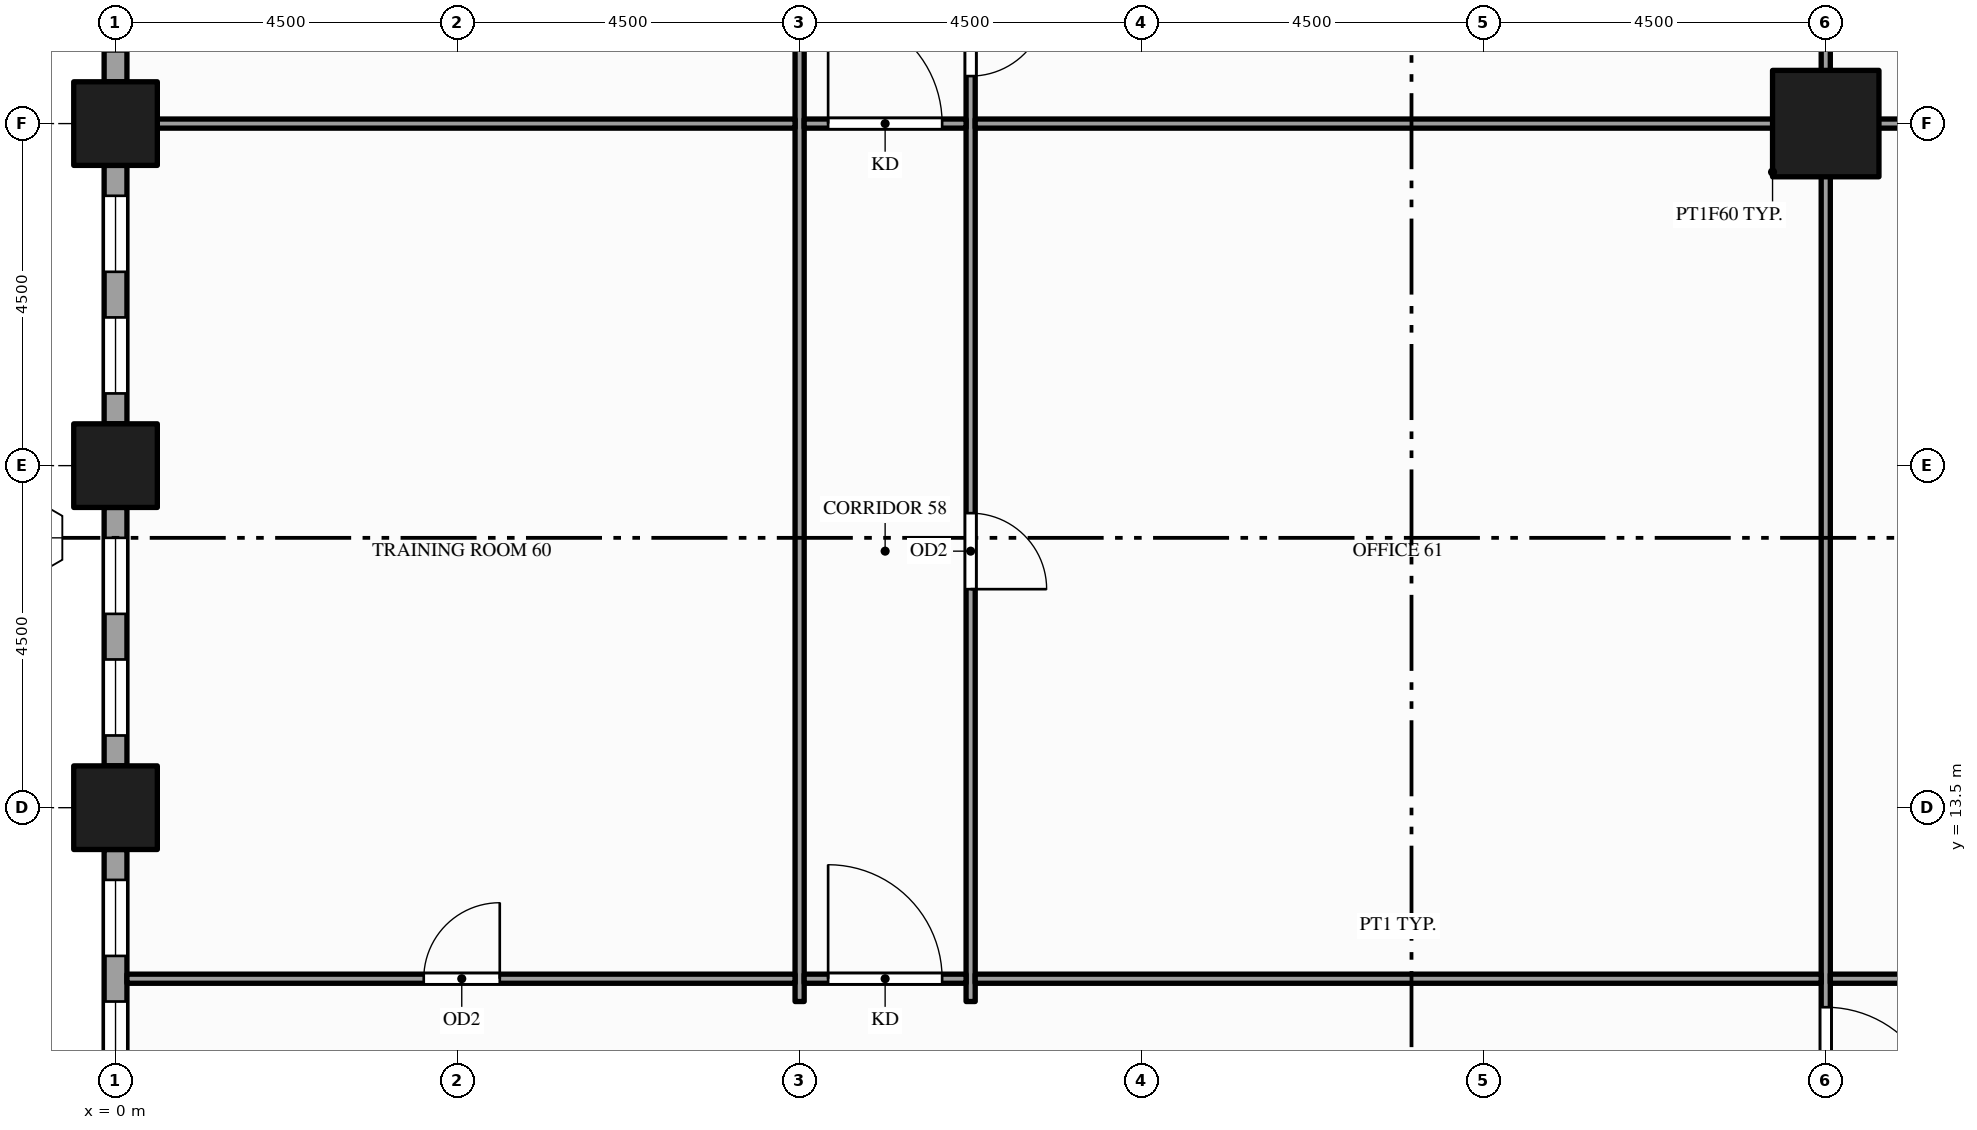
"""IFC4 building model, lengths in metres.
Left out: names, types, materials, properties, quantities, classifications, styles, units other than length and angle.
Written with IfcOpenShell. Run it as: python <this file> out.ifc"""

import sys

from ifc_helpers import new_model, si_unit, direction, frame, frame_2d, origin, origin_2d, place, context, subcontext, project, spatial, rectangle, hollow_rectangle, extrude, element, fill, save


model = new_model("IFC4")
c1 = context("Model", 3, precision=1e-05, world=origin(), true_north=direction((0.0, 1.0)))
c2 = subcontext(c1, "Body", "Model", "MODEL_VIEW")
j1 = project(units=[si_unit("LENGTHUNIT", "METRE"), si_unit("PLANEANGLEUNIT", "RADIAN")], contexts=[c1])
p1 = place(None, origin())
s1 = spatial("IfcSite", under=j1, at=p1, CompositionType="ELEMENT")
p2 = place(p1, origin())
s2 = spatial("IfcBuilding", under=s1, at=p2, CompositionType="ELEMENT")
p3 = place(p2, frame((0.0, 0.0, 19.0)))
s3 = spatial("IfcBuildingStorey", under=s2, at=p3, CompositionType="ELEMENT", Elevation=19.0)
for number, where, z_axis, x_axis in (
    (1, (0.0, 13.5, -0.25), (0.0, 0.0, 1.0), (1.0, 0.0, 0.0)),
    (2, (0.0, 18.0, -0.25), (0.0, 0.0, 1.0), (1.0, 0.0, 0.0)),
    (3, (0.0, 22.5, -0.25), (0.0, 0.0, 1.0), (1.0, 0.0, 0.0)),
):
    element("IfcColumn", number, at=place(p3, frame(where, z_axis=z_axis, x_axis=x_axis)), inside=s3, PredefinedType="COLUMN", context=c2, shape_type="SweptSolid", body=[
        extrude(hollow_rectangle(XDim=1.1, YDim=1.1, WallThickness=0.06, at=origin_2d()), origin(), (0.0, 0.0, 1.0), 5.0),
    ])
p4 = place(p3, frame((22.5, 22.5, -0.25), z_axis=(0.0, 0.0, 1.0), x_axis=(1.0, 0.0, 0.0)))
e4 = element("IfcColumn", 4, at=p4, inside=s3, PredefinedType="COLUMN", context=c2, shape_type="SweptSolid", body=[
    extrude(hollow_rectangle(XDim=1.4, YDim=1.4, WallThickness=0.08, at=origin_2d()), origin(), (0.0, 0.0, 1.0), 5.0),
])
p5 = place(p3, frame((0.0, 26.45, 0.0), z_axis=(0.0, 0.0, 1.0), x_axis=(0.0, -1.0, 0.0)))
e5 = element("IfcWall", 5, at=p5, inside=s3, PredefinedType="STANDARD", context=c2, shape_type="SweptSolid", body=[
    extrude(rectangle(XDim=3.4, YDim=0.3, at=frame_2d((1.7, 0.0))), origin(), (0.0, 0.0, 1.0), 4.036),
])
p6 = place(p5, frame((0.4, 0.0, 0.9)))
e6 = element("IfcOpeningElement", 6, at=p6, cuts=e5, PredefinedType="OPENING", context=c2, shape_type="SweptSolid", body=[
    extrude(rectangle(XDim=1.0, YDim=2.75, at=frame_2d((0.5, 1.375))), frame((0.0, 0.16, 0.0), z_axis=(0.0, -1.0, 0.0), x_axis=(1.0, 0.0, 0.0)), (0.0, 0.0, 1.0), 0.32),
])
p7 = place(p5, frame((2.0, 0.0, 0.9)))
e7 = element("IfcOpeningElement", 7, at=p7, cuts=e5, PredefinedType="OPENING", context=c2, shape_type="SweptSolid", body=[
    extrude(rectangle(XDim=1.0, YDim=2.75, at=frame_2d((0.5, 1.375))), frame((0.0, 0.16, 0.0), z_axis=(0.0, -1.0, 0.0), x_axis=(1.0, 0.0, 0.0)), (0.0, 0.0, 1.0), 0.32),
])
p8 = place(p3, frame((0.0, 21.95, 0.0), z_axis=(0.0, 0.0, 1.0), x_axis=(0.0, -1.0, 0.0)))
e8 = element("IfcWall", 8, at=p8, inside=s3, PredefinedType="STANDARD", context=c2, shape_type="SweptSolid", body=[
    extrude(rectangle(XDim=3.4, YDim=0.3, at=frame_2d((1.7, 0.0))), origin(), (0.0, 0.0, 1.0), 4.036),
])
p9 = place(p8, frame((0.4, 0.0, 0.9)))
e9 = element("IfcOpeningElement", 9, at=p9, cuts=e8, PredefinedType="OPENING", context=c2, shape_type="SweptSolid", body=[
    extrude(rectangle(XDim=1.0, YDim=2.75, at=frame_2d((0.5, 1.375))), frame((0.0, 0.16, 0.0), z_axis=(0.0, -1.0, 0.0), x_axis=(1.0, 0.0, 0.0)), (0.0, 0.0, 1.0), 0.32),
])
p10 = place(p8, frame((2.0, 0.0, 0.9)))
e10 = element("IfcOpeningElement", 10, at=p10, cuts=e8, PredefinedType="OPENING", context=c2, shape_type="SweptSolid", body=[
    extrude(rectangle(XDim=1.0, YDim=2.75, at=frame_2d((0.5, 1.375))), frame((0.0, 0.16, 0.0), z_axis=(0.0, -1.0, 0.0), x_axis=(1.0, 0.0, 0.0)), (0.0, 0.0, 1.0), 0.32),
])
p11 = place(p3, frame((0.0, 17.45, 0.0), z_axis=(0.0, 0.0, 1.0), x_axis=(0.0, -1.0, 0.0)))
e11 = element("IfcWall", 11, at=p11, inside=s3, PredefinedType="STANDARD", context=c2, shape_type="SweptSolid", body=[
    extrude(rectangle(XDim=3.4, YDim=0.3, at=frame_2d((1.7, 0.0))), origin(), (0.0, 0.0, 1.0), 4.036),
])
p12 = place(p11, frame((0.4, 0.0, 0.9)))
e12 = element("IfcOpeningElement", 12, at=p12, cuts=e11, PredefinedType="OPENING", context=c2, shape_type="SweptSolid", body=[
    extrude(rectangle(XDim=1.0, YDim=2.75, at=frame_2d((0.5, 1.375))), frame((0.0, 0.16, 0.0), z_axis=(0.0, -1.0, 0.0), x_axis=(1.0, 0.0, 0.0)), (0.0, 0.0, 1.0), 0.32),
])
p13 = place(p11, frame((2.0, 0.0, 0.9)))
e13 = element("IfcOpeningElement", 13, at=p13, cuts=e11, PredefinedType="OPENING", context=c2, shape_type="SweptSolid", body=[
    extrude(rectangle(XDim=1.0, YDim=2.75, at=frame_2d((0.5, 1.375))), frame((0.0, 0.16, 0.0), z_axis=(0.0, -1.0, 0.0), x_axis=(1.0, 0.0, 0.0)), (0.0, 0.0, 1.0), 0.32),
])
p14 = place(p3, frame((0.0, 12.95, 0.0), z_axis=(0.0, 0.0, 1.0), x_axis=(0.0, -1.0, 0.0)))
e14 = element("IfcWall", 14, at=p14, inside=s3, PredefinedType="STANDARD", context=c2, shape_type="SweptSolid", body=[
    extrude(rectangle(XDim=3.4, YDim=0.3, at=frame_2d((1.7, 0.0))), origin(), (0.0, 0.0, 1.0), 4.036),
])
p15 = place(p14, frame((0.4, 0.0, 0.9)))
e15 = element("IfcOpeningElement", 15, at=p15, cuts=e14, PredefinedType="OPENING", context=c2, shape_type="SweptSolid", body=[
    extrude(rectangle(XDim=1.0, YDim=2.75, at=frame_2d((0.5, 1.375))), frame((0.0, 0.16, 0.0), z_axis=(0.0, -1.0, 0.0), x_axis=(1.0, 0.0, 0.0)), (0.0, 0.0, 1.0), 0.32),
])
p16 = place(p14, frame((2.0, 0.0, 0.9)))
e16 = element("IfcOpeningElement", 16, at=p16, cuts=e14, PredefinedType="OPENING", context=c2, shape_type="SweptSolid", body=[
    extrude(rectangle(XDim=1.0, YDim=2.75, at=frame_2d((0.5, 1.375))), frame((0.0, 0.16, 0.0), z_axis=(0.0, -1.0, 0.0), x_axis=(1.0, 0.0, 0.0)), (0.0, 0.0, 1.0), 0.32),
])
p17 = place(p3, frame((9.0, 10.95, 0.0), z_axis=(0.0, 0.0, 1.0), x_axis=(0.0, 1.0, 0.0)))
e17 = element("IfcWall", 17, at=p17, inside=s3, PredefinedType="PARTITIONING", context=c2, shape_type="SweptSolid", body=[
    extrude(rectangle(XDim=20.85, YDim=0.12, at=frame_2d((10.425, 0.0))), origin(), (0.0, 0.0, 1.0), 3.5),
])
p18 = place(p17, frame((15.55, 0.0, 0.0)))
e18 = element("IfcOpeningElement", 18, at=p18, cuts=e17, PredefinedType="OPENING", context=c2, shape_type="SweptSolid", body=[
    extrude(rectangle(XDim=1.0, YDim=2.1, at=frame_2d((0.5, 1.05))), frame((0.0, 0.07, 0.0), z_axis=(0.0, -1.0, 0.0), x_axis=(1.0, 0.0, 0.0)), (0.0, 0.0, 1.0), 0.14),
])
p19 = place(p3, frame((11.25, 10.95, 0.0), z_axis=(0.0, 0.0, 1.0), x_axis=(0.0, 1.0, 0.0)))
e19 = element("IfcWall", 19, at=p19, inside=s3, PredefinedType="PARTITIONING", context=c2, shape_type="SweptSolid", body=[
    extrude(rectangle(XDim=20.85, YDim=0.12, at=frame_2d((10.425, 0.0))), origin(), (0.0, 0.0, 1.0), 3.5),
])
p20 = place(p19, frame((5.425, 0.0, 0.0)))
e20 = element("IfcOpeningElement", 20, at=p20, cuts=e19, PredefinedType="OPENING", context=c2, shape_type="SweptSolid", body=[
    extrude(rectangle(XDim=1.0, YDim=2.1, at=frame_2d((0.5, 1.05))), frame((0.0, 0.07, 0.0), z_axis=(0.0, -1.0, 0.0), x_axis=(1.0, 0.0, 0.0)), (0.0, 0.0, 1.0), 0.14),
])
p21 = place(p19, frame((12.175, 0.0, 0.0)))
e21 = element("IfcOpeningElement", 21, at=p21, cuts=e19, PredefinedType="OPENING", context=c2, shape_type="SweptSolid", body=[
    extrude(rectangle(XDim=1.0, YDim=2.1, at=frame_2d((0.5, 1.05))), frame((0.0, 0.07, 0.0), z_axis=(0.0, -1.0, 0.0), x_axis=(1.0, 0.0, 0.0)), (0.0, 0.0, 1.0), 0.14),
])
p22 = place(p19, frame((16.675, 0.0, 0.0)))
e22 = element("IfcOpeningElement", 22, at=p22, cuts=e19, PredefinedType="OPENING", context=c2, shape_type="SweptSolid", body=[
    extrude(rectangle(XDim=1.0, YDim=2.1, at=frame_2d((0.5, 1.05))), frame((0.0, 0.07, 0.0), z_axis=(0.0, -1.0, 0.0), x_axis=(1.0, 0.0, 0.0)), (0.0, 0.0, 1.0), 0.14),
])
p23 = place(p3, frame((22.5, 0.15, 0.0), z_axis=(0.0, 0.0, 1.0), x_axis=(0.0, 1.0, 0.0)))
e23 = element("IfcWall", 23, at=p23, inside=s3, PredefinedType="PARTITIONING", context=c2, shape_type="SweptSolid", body=[
    extrude(rectangle(XDim=35.95, YDim=0.12, at=frame_2d((17.975, 0.0))), origin(), (0.0, 0.0, 1.0), 3.759),
])
p24 = place(p23, frame((9.225, 0.0, 0.0)))
e24 = element("IfcOpeningElement", 24, at=p24, cuts=e23, PredefinedType="OPENING", context=c2, shape_type="SweptSolid", body=[
    extrude(rectangle(XDim=1.5, YDim=2.1, at=frame_2d((0.75, 1.05))), frame((0.0, 0.07, 0.0), z_axis=(0.0, -1.0, 0.0), x_axis=(1.0, 0.0, 0.0)), (0.0, 0.0, 1.0), 0.14),
])
p25 = place(p23, frame((32.7, 0.0, 0.0)))
e25 = element("IfcOpeningElement", 25, at=p25, cuts=e23, PredefinedType="OPENING", context=c2, shape_type="SweptSolid", body=[
    extrude(rectangle(XDim=1.8, YDim=2.1, at=frame_2d((0.9, 1.05))), frame((0.0, 0.07, 0.0), z_axis=(0.0, -1.0, 0.0), x_axis=(1.0, 0.0, 0.0)), (0.0, 0.0, 1.0), 0.14),
])
p26 = place(p3, frame((0.15, 11.25, 0.0), z_axis=(0.0, 0.0, 1.0), x_axis=(1.0, 0.0, 0.0)))
e26 = element("IfcWall", 26, at=p26, inside=s3, PredefinedType="PARTITIONING", context=c2, shape_type="SweptSolid", body=[
    extrude(rectangle(XDim=8.79, YDim=0.12, at=frame_2d((4.395, 0.0))), origin(), (0.0, 0.0, 1.0), 3.759),
])
p27 = place(p26, frame((3.905, 0.0, 0.0)))
e27 = element("IfcOpeningElement", 27, at=p27, cuts=e26, PredefinedType="OPENING", context=c2, shape_type="SweptSolid", body=[
    extrude(rectangle(XDim=1.0, YDim=2.1, at=frame_2d((0.5, 1.05))), frame((0.0, 0.07, 0.0), z_axis=(0.0, -1.0, 0.0), x_axis=(1.0, 0.0, 0.0)), (0.0, 0.0, 1.0), 0.14),
])
p28 = place(p3, frame((9.06, 11.25, 0.0), z_axis=(0.0, 0.0, 1.0), x_axis=(1.0, 0.0, 0.0)))
e28 = element("IfcWall", 28, at=p28, inside=s3, PredefinedType="PARTITIONING", context=c2, shape_type="SweptSolid", body=[
    extrude(rectangle(XDim=2.13, YDim=0.12, at=frame_2d((1.065, 0.0))), origin(), (0.0, 0.0, 1.0), 3.759),
])
p29 = place(p28, frame((0.315, 0.0, 0.0)))
e29 = element("IfcOpeningElement", 29, at=p29, cuts=e28, PredefinedType="OPENING", context=c2, shape_type="SweptSolid", body=[
    extrude(rectangle(XDim=1.5, YDim=2.1, at=frame_2d((0.75, 1.05))), frame((0.0, 0.07, 0.0), z_axis=(0.0, -1.0, 0.0), x_axis=(1.0, 0.0, 0.0)), (0.0, 0.0, 1.0), 0.14),
])
p30 = place(p3, frame((11.31, 11.25, 0.0), z_axis=(0.0, 0.0, 1.0), x_axis=(1.0, 0.0, 0.0)))
e30 = element("IfcWall", 30, at=p30, inside=s3, PredefinedType="PARTITIONING", context=c2, shape_type="SweptSolid", body=[
    extrude(rectangle(XDim=11.13, YDim=0.12, at=frame_2d((5.565, 0.0))), origin(), (0.0, 0.0, 1.0), 3.759),
])
p31 = place(p3, frame((22.56, 11.25, 0.0), z_axis=(0.0, 0.0, 1.0), x_axis=(1.0, 0.0, 0.0)))
e31 = element("IfcWall", 31, at=p31, inside=s3, PredefinedType="PARTITIONING", context=c2, shape_type="SweptSolid", body=[
    extrude(rectangle(XDim=13.38, YDim=0.12, at=frame_2d((6.69, 0.0))), origin(), (0.0, 0.0, 1.0), 3.66),
])
p32 = place(p31, frame((6.09, 0.0, 0.0)))
e32 = element("IfcOpeningElement", 32, at=p32, cuts=e31, PredefinedType="OPENING", context=c2, shape_type="SweptSolid", body=[
    extrude(rectangle(XDim=1.2, YDim=2.1, at=frame_2d((0.6, 1.05))), frame((0.0, 0.07, 0.0), z_axis=(0.0, -1.0, 0.0), x_axis=(1.0, 0.0, 0.0)), (0.0, 0.0, 1.0), 0.14),
])
p33 = place(p3, frame((0.15, 22.5, 0.0), z_axis=(0.0, 0.0, 1.0), x_axis=(1.0, 0.0, 0.0)))
e33 = element("IfcWall", 33, at=p33, inside=s3, PredefinedType="PARTITIONING", context=c2, shape_type="SweptSolid", body=[
    extrude(rectangle(XDim=8.79, YDim=0.12, at=frame_2d((4.395, 0.0))), origin(), (0.0, 0.0, 1.0), 3.5),
])
p34 = place(p3, frame((9.06, 22.5, 0.0), z_axis=(0.0, 0.0, 1.0), x_axis=(1.0, 0.0, 0.0)))
e34 = element("IfcWall", 34, at=p34, inside=s3, PredefinedType="PARTITIONING", context=c2, shape_type="SweptSolid", body=[
    extrude(rectangle(XDim=2.13, YDim=0.12, at=frame_2d((1.065, 0.0))), origin(), (0.0, 0.0, 1.0), 3.5),
])
p35 = place(p34, frame((0.315, 0.0, 0.0)))
e35 = element("IfcOpeningElement", 35, at=p35, cuts=e34, PredefinedType="OPENING", context=c2, shape_type="SweptSolid", body=[
    extrude(rectangle(XDim=1.5, YDim=2.1, at=frame_2d((0.75, 1.05))), frame((0.0, 0.07, 0.0), z_axis=(0.0, -1.0, 0.0), x_axis=(1.0, 0.0, 0.0)), (0.0, 0.0, 1.0), 0.14),
])
p36 = place(p3, frame((11.31, 22.5, 0.0), z_axis=(0.0, 0.0, 1.0), x_axis=(1.0, 0.0, 0.0)))
e36 = element("IfcWall", 36, at=p36, inside=s3, PredefinedType="PARTITIONING", context=c2, shape_type="SweptSolid", body=[
    extrude(rectangle(XDim=11.13, YDim=0.12, at=frame_2d((5.565, 0.0))), origin(), (0.0, 0.0, 1.0), 3.5),
])
p37 = place(p3, frame((22.56, 22.5, 0.0), z_axis=(0.0, 0.0, 1.0), x_axis=(1.0, 0.0, 0.0)))
e37 = element("IfcWall", 37, at=p37, inside=s3, PredefinedType="PARTITIONING", context=c2, shape_type="SweptSolid", body=[
    extrude(rectangle(XDim=13.38, YDim=0.12, at=frame_2d((6.69, 0.0))), origin(), (0.0, 0.0, 1.0), 3.66),
])
p38 = place(p9, origin())
e38 = element("IfcWindow", 38, at=p38, inside=s3, PartitioningType="SINGLE_PANEL", PredefinedType="WINDOW", context=c2, shape_type="SweptSolid", body=[
    extrude(rectangle(XDim=1.0, YDim=2.75, at=frame_2d((0.5, 1.375))), frame((0.0, 0.03, 0.0), z_axis=(0.0, -1.0, 0.0), x_axis=(1.0, 0.0, 0.0)), (0.0, 0.0, 1.0), 0.06),
])
fill(e9, e38)
p39 = place(p10, origin())
e39 = element("IfcWindow", 39, at=p39, inside=s3, PartitioningType="SINGLE_PANEL", PredefinedType="WINDOW", context=c2, shape_type="SweptSolid", body=[
    extrude(rectangle(XDim=1.0, YDim=2.75, at=frame_2d((0.5, 1.375))), frame((0.0, 0.03, 0.0), z_axis=(0.0, -1.0, 0.0), x_axis=(1.0, 0.0, 0.0)), (0.0, 0.0, 1.0), 0.06),
])
fill(e10, e39)
p40 = place(p12, origin())
e40 = element("IfcWindow", 40, at=p40, inside=s3, PartitioningType="SINGLE_PANEL", PredefinedType="WINDOW", context=c2, shape_type="SweptSolid", body=[
    extrude(rectangle(XDim=1.0, YDim=2.75, at=frame_2d((0.5, 1.375))), frame((0.0, 0.03, 0.0), z_axis=(0.0, -1.0, 0.0), x_axis=(1.0, 0.0, 0.0)), (0.0, 0.0, 1.0), 0.06),
])
fill(e12, e40)
p41 = place(p13, origin())
e41 = element("IfcWindow", 41, at=p41, inside=s3, PartitioningType="SINGLE_PANEL", PredefinedType="WINDOW", context=c2, shape_type="SweptSolid", body=[
    extrude(rectangle(XDim=1.0, YDim=2.75, at=frame_2d((0.5, 1.375))), frame((0.0, 0.03, 0.0), z_axis=(0.0, -1.0, 0.0), x_axis=(1.0, 0.0, 0.0)), (0.0, 0.0, 1.0), 0.06),
])
fill(e13, e41)
p42 = place(p15, origin())
e42 = element("IfcWindow", 42, at=p42, inside=s3, PartitioningType="SINGLE_PANEL", PredefinedType="WINDOW", context=c2, shape_type="SweptSolid", body=[
    extrude(rectangle(XDim=1.0, YDim=2.75, at=frame_2d((0.5, 1.375))), frame((0.0, 0.03, 0.0), z_axis=(0.0, -1.0, 0.0), x_axis=(1.0, 0.0, 0.0)), (0.0, 0.0, 1.0), 0.06),
])
fill(e15, e42)
p43 = place(p16, origin())
e43 = element("IfcWindow", 43, at=p43, inside=s3, PartitioningType="SINGLE_PANEL", PredefinedType="WINDOW", context=c2, shape_type="SweptSolid", body=[
    extrude(rectangle(XDim=1.0, YDim=2.75, at=frame_2d((0.5, 1.375))), frame((0.0, 0.03, 0.0), z_axis=(0.0, -1.0, 0.0), x_axis=(1.0, 0.0, 0.0)), (0.0, 0.0, 1.0), 0.06),
])
fill(e16, e43)
p44 = place(p24, origin())
e44 = element("IfcDoor", 44, at=p44, inside=s3, OperationType="SINGLE_SWING_LEFT", PredefinedType="DOOR", context=c2, shape_type="SweptSolid", body=[
    extrude(rectangle(XDim=1.5, YDim=2.1, at=frame_2d((0.75, 1.05))), frame((0.0, 0.025, 0.0), z_axis=(0.0, -1.0, 0.0), x_axis=(1.0, 0.0, 0.0)), (0.0, 0.0, 1.0), 0.05),
])
fill(e24, e44)
p45 = place(p29, origin())
e45 = element("IfcDoor", 45, at=p45, inside=s3, OperationType="SINGLE_SWING_LEFT", PredefinedType="DOOR", context=c2, shape_type="SweptSolid", body=[
    extrude(rectangle(XDim=1.5, YDim=2.1, at=frame_2d((0.75, 1.05))), frame((0.0, 0.025, 0.0), z_axis=(0.0, -1.0, 0.0), x_axis=(1.0, 0.0, 0.0)), (0.0, 0.0, 1.0), 0.05),
])
fill(e29, e45)
p46 = place(p27, origin())
e46 = element("IfcDoor", 46, at=p46, inside=s3, OperationType="SINGLE_SWING_RIGHT", PredefinedType="DOOR", context=c2, shape_type="SweptSolid", body=[
    extrude(rectangle(XDim=1.0, YDim=2.1, at=frame_2d((0.5, 1.05))), frame((0.0, 0.025, 0.0), z_axis=(0.0, -1.0, 0.0), x_axis=(1.0, 0.0, 0.0)), (0.0, 0.0, 1.0), 0.05),
])
fill(e27, e46)
p47 = place(p20, origin())
e47 = element("IfcDoor", 47, at=p47, inside=s3, OperationType="SINGLE_SWING_LEFT", PredefinedType="DOOR", context=c2, shape_type="SweptSolid", body=[
    extrude(rectangle(XDim=1.0, YDim=2.1, at=frame_2d((0.5, 1.05))), frame((0.0, 0.025, 0.0), z_axis=(0.0, -1.0, 0.0), x_axis=(1.0, 0.0, 0.0)), (0.0, 0.0, 1.0), 0.05),
])
fill(e20, e47)
p48 = place(p35, origin())
e48 = element("IfcDoor", 48, at=p48, inside=s3, OperationType="SINGLE_SWING_LEFT", PredefinedType="DOOR", context=c2, shape_type="SweptSolid", body=[
    extrude(rectangle(XDim=1.5, YDim=2.1, at=frame_2d((0.75, 1.05))), frame((0.0, 0.025, 0.0), z_axis=(0.0, -1.0, 0.0), x_axis=(1.0, 0.0, 0.0)), (0.0, 0.0, 1.0), 0.05),
])
fill(e35, e48)
p49 = place(p21, origin())
e49 = element("IfcDoor", 49, at=p49, inside=s3, OperationType="SINGLE_SWING_RIGHT", PredefinedType="DOOR", context=c2, shape_type="SweptSolid", body=[
    extrude(rectangle(XDim=1.0, YDim=2.1, at=frame_2d((0.5, 1.05))), frame((0.0, 0.025, 0.0), z_axis=(0.0, -1.0, 0.0), x_axis=(1.0, 0.0, 0.0)), (0.0, 0.0, 1.0), 0.05),
])
fill(e21, e49)
save(model, sys.argv[1])
